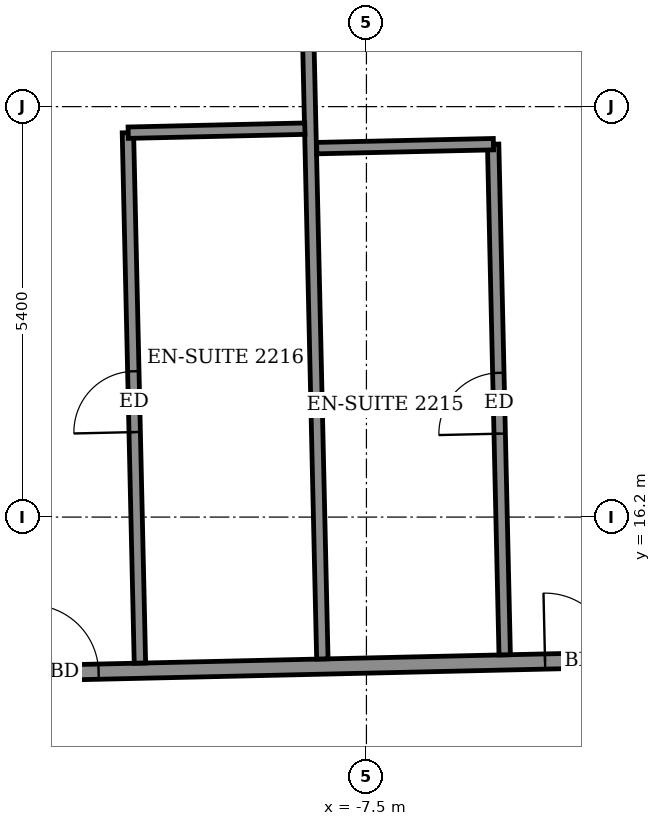
"""IFC4 building model, lengths in metres.
Left out: names, types, materials, properties, quantities, classifications, styles, units other than length and angle.
Written with IfcOpenShell. Run it as: python <this file> out.ifc"""

import sys

from ifc_helpers import new_model, si_unit, direction, frame, frame_2d, origin, place, context, subcontext, project, spatial, rectangle, extrude, element, fill, save


model = new_model("IFC4")
c1 = context("Model", 3, precision=1e-05, world=origin(), true_north=direction((0.0, 1.0)))
c2 = subcontext(c1, "Body", "Model", "MODEL_VIEW")
j1 = project(units=[si_unit("LENGTHUNIT", "METRE"), si_unit("PLANEANGLEUNIT", "RADIAN")], contexts=[c1])
p1 = place(None, origin())
s1 = spatial("IfcSite", under=j1, at=p1, CompositionType="ELEMENT")
p2 = place(p1, origin())
s2 = spatial("IfcBuilding", under=s1, at=p2, CompositionType="ELEMENT")
p3 = place(p2, frame((0.0, 0.0, 90.1)))
s3 = spatial("IfcBuildingStorey", under=s2, at=p3, CompositionType="ELEMENT", Elevation=90.1)
p4 = place(p3, frame((-24.92, 13.851, 0.0), z_axis=(0.0, 0.0, 1.0), x_axis=(0.999742411711, 0.022696039895, 0.0)))
e1 = element("IfcWall", 1, at=p4, inside=s3, PredefinedType="PARTITIONING", context=c2, shape_type="SweptSolid", body=[
    extrude(rectangle(XDim=52.472, YDim=0.2, at=frame_2d((26.236, 0.0))), origin(), (0.0, 0.0, 1.0), 3.05),
])
p5 = place(p4, frame((50.088, 0.0, 0.0)))
e2 = element("IfcOpeningElement", 2, at=p5, cuts=e1, PredefinedType="OPENING", context=c2, shape_type="SweptSolid", body=[
    extrude(rectangle(XDim=1.0, YDim=2.1, at=frame_2d((0.5, 1.05))), frame((0.0, 0.11, 0.0), z_axis=(0.0, -1.0, 0.0), x_axis=(1.0, 0.0, 0.0)), (0.0, 0.0, 1.0), 0.22),
])
p6 = place(p4, frame((45.725, 0.0, 0.0)))
e3 = element("IfcOpeningElement", 3, at=p6, cuts=e1, PredefinedType="OPENING", context=c2, shape_type="SweptSolid", body=[
    extrude(rectangle(XDim=0.9, YDim=2.1, at=frame_2d((0.45, 1.05))), frame((0.0, 0.11, 0.0), z_axis=(0.0, -1.0, 0.0), x_axis=(1.0, 0.0, 0.0)), (0.0, 0.0, 1.0), 0.22),
])
p7 = place(p4, frame((38.975, 0.0, 0.0)))
e4 = element("IfcOpeningElement", 4, at=p7, cuts=e1, PredefinedType="OPENING", context=c2, shape_type="SweptSolid", body=[
    extrude(rectangle(XDim=0.9, YDim=2.1, at=frame_2d((0.45, 1.05))), frame((0.0, 0.11, 0.0), z_axis=(0.0, -1.0, 0.0), x_axis=(1.0, 0.0, 0.0)), (0.0, 0.0, 1.0), 0.22),
])
p8 = place(p4, frame((37.05, 0.0, 0.0)))
e5 = element("IfcOpeningElement", 5, at=p8, cuts=e1, PredefinedType="OPENING", context=c2, shape_type="SweptSolid", body=[
    extrude(rectangle(XDim=0.9, YDim=2.1, at=frame_2d((0.45, 1.05))), frame((0.0, 0.11, 0.0), z_axis=(0.0, -1.0, 0.0), x_axis=(1.0, 0.0, 0.0)), (0.0, 0.0, 1.0), 0.22),
])
p9 = place(p4, frame((30.35, 0.0, 0.0)))
e6 = element("IfcOpeningElement", 6, at=p9, cuts=e1, PredefinedType="OPENING", context=c2, shape_type="SweptSolid", body=[
    extrude(rectangle(XDim=0.9, YDim=2.1, at=frame_2d((0.45, 1.05))), frame((0.0, 0.11, 0.0), z_axis=(0.0, -1.0, 0.0), x_axis=(1.0, 0.0, 0.0)), (0.0, 0.0, 1.0), 0.22),
])
p10 = place(p4, frame((28.4, 0.0, 0.0)))
e7 = element("IfcOpeningElement", 7, at=p10, cuts=e1, PredefinedType="OPENING", context=c2, shape_type="SweptSolid", body=[
    extrude(rectangle(XDim=0.9, YDim=2.1, at=frame_2d((0.45, 1.05))), frame((0.0, 0.11, 0.0), z_axis=(0.0, -1.0, 0.0), x_axis=(1.0, 0.0, 0.0)), (0.0, 0.0, 1.0), 0.22),
])
p11 = place(p4, frame((21.675, 0.0, 0.0)))
e8 = element("IfcOpeningElement", 8, at=p11, cuts=e1, PredefinedType="OPENING", context=c2, shape_type="SweptSolid", body=[
    extrude(rectangle(XDim=0.9, YDim=2.1, at=frame_2d((0.45, 1.05))), frame((0.0, 0.11, 0.0), z_axis=(0.0, -1.0, 0.0), x_axis=(1.0, 0.0, 0.0)), (0.0, 0.0, 1.0), 0.22),
])
p12 = place(p4, frame((19.775, 0.0, 0.0)))
e9 = element("IfcOpeningElement", 9, at=p12, cuts=e1, PredefinedType="OPENING", context=c2, shape_type="SweptSolid", body=[
    extrude(rectangle(XDim=0.9, YDim=2.1, at=frame_2d((0.45, 1.05))), frame((0.0, 0.11, 0.0), z_axis=(0.0, -1.0, 0.0), x_axis=(1.0, 0.0, 0.0)), (0.0, 0.0, 1.0), 0.22),
])
p13 = place(p4, frame((13.0, 0.0, 0.0)))
e10 = element("IfcOpeningElement", 10, at=p13, cuts=e1, PredefinedType="OPENING", context=c2, shape_type="SweptSolid", body=[
    extrude(rectangle(XDim=0.9, YDim=2.1, at=frame_2d((0.45, 1.05))), frame((0.0, 0.11, 0.0), z_axis=(0.0, -1.0, 0.0), x_axis=(1.0, 0.0, 0.0)), (0.0, 0.0, 1.0), 0.22),
])
p14 = place(p4, frame((11.075, 0.0, 0.0)))
e11 = element("IfcOpeningElement", 11, at=p14, cuts=e1, PredefinedType="OPENING", context=c2, shape_type="SweptSolid", body=[
    extrude(rectangle(XDim=0.9, YDim=2.1, at=frame_2d((0.45, 1.05))), frame((0.0, 0.11, 0.0), z_axis=(0.0, -1.0, 0.0), x_axis=(1.0, 0.0, 0.0)), (0.0, 0.0, 1.0), 0.22),
])
p15 = place(p4, frame((3.049, 0.0, 0.0)))
e12 = element("IfcOpeningElement", 12, at=p15, cuts=e1, PredefinedType="OPENING", context=c2, shape_type="SweptSolid", body=[
    extrude(rectangle(XDim=1.0, YDim=2.1, at=frame_2d((0.5, 1.05))), frame((0.0, 0.11, 0.0), z_axis=(0.0, -1.0, 0.0), x_axis=(1.0, 0.0, 0.0)), (0.0, 0.0, 1.0), 0.22),
])
p16 = place(p3, frame((-10.48, 14.279, 0.0), z_axis=(0.0, 0.0, 1.0), x_axis=(-0.022630826984, 0.999743890039, 0.0)))
e13 = element("IfcWall", 13, at=p16, inside=s3, PredefinedType="PARTITIONING", context=c2, shape_type="SweptSolid", body=[
    extrude(rectangle(XDim=6.98, YDim=0.15, at=frame_2d((3.49, 0.0))), origin(), (0.0, 0.0, 1.0), 3.05),
])
p17 = place(p16, frame((3.04, 0.0, 0.0)))
e14 = element("IfcOpeningElement", 14, at=p17, cuts=e13, PredefinedType="OPENING", context=c2, shape_type="SweptSolid", body=[
    extrude(rectangle(XDim=0.8, YDim=2.1, at=frame_2d((0.4, 1.05))), frame((0.0, 0.085, 0.0), z_axis=(0.0, -1.0, 0.0), x_axis=(1.0, 0.0, 0.0)), (0.0, 0.0, 1.0), 0.17),
])
p18 = place(p3, frame((-8.08, 14.334, 0.0), z_axis=(0.0, 0.0, 1.0), x_axis=(-0.022741979748, 0.999741367733, 0.0)))
e15 = element("IfcWall", 15, at=p18, inside=s3, PredefinedType="PARTITIONING", context=c2, shape_type="SweptSolid", body=[
    extrude(rectangle(XDim=12.399, YDim=0.15, at=frame_2d((6.2, 0.0))), origin(), (0.0, 0.0, 1.0), 3.05),
])
p19 = place(p3, frame((-5.681, 14.388, 0.0), z_axis=(0.0, 0.0, 1.0), x_axis=(-0.022634748998, 0.99974380125, 0.0)))
e16 = element("IfcWall", 16, at=p19, inside=s3, PredefinedType="PARTITIONING", context=c2, shape_type="SweptSolid", body=[
    extrude(rectangle(XDim=6.72, YDim=0.15, at=frame_2d((3.36, 0.0))), origin(), (0.0, 0.0, 1.0), 3.05),
])
p20 = place(p19, frame((2.91, 0.0, 0.0)))
e17 = element("IfcOpeningElement", 17, at=p20, cuts=e16, PredefinedType="OPENING", context=c2, shape_type="SweptSolid", body=[
    extrude(rectangle(XDim=0.8, YDim=2.1, at=frame_2d((0.4, 1.05))), frame((0.0, 0.085, 0.0), z_axis=(0.0, -1.0, 0.0), x_axis=(1.0, 0.0, 0.0)), (0.0, 0.0, 1.0), 0.17),
])
p21 = place(p3, frame((-8.154, 21.054, 0.0), z_axis=(0.0, 0.0, 1.0), x_axis=(0.999749954681, 0.022361308448, 0.0)))
e18 = element("IfcWall", 18, at=p21, inside=s3, PredefinedType="PARTITIONING", context=c2, shape_type="SweptSolid", body=[
    extrude(rectangle(XDim=2.325, YDim=0.15, at=frame_2d((1.163, 0.0))), origin(), (0.0, 0.0, 1.0), 3.05),
])
p22 = place(p3, frame((-10.634, 21.257, 0.0), z_axis=(0.0, 0.0, 1.0), x_axis=(0.999740260747, 0.02279059109, 0.0)))
e19 = element("IfcWall", 19, at=p22, inside=s3, PredefinedType="PARTITIONING", context=c2, shape_type="SweptSolid", body=[
    extrude(rectangle(XDim=2.324, YDim=0.15, at=frame_2d((1.162, 0.0))), origin(), (0.0, 0.0, 1.0), 3.05),
])
p23 = place(p12, origin())
e20 = element("IfcDoor", 20, at=p23, inside=s3, OperationType="SINGLE_SWING_LEFT", PredefinedType="DOOR", context=c2, shape_type="SweptSolid", body=[
    extrude(rectangle(XDim=0.9, YDim=2.1, at=frame_2d((0.45, 1.05))), frame((0.0, 0.025, 0.0), z_axis=(0.0, -1.0, 0.0), x_axis=(1.0, 0.0, 0.0)), (0.0, 0.0, 1.0), 0.05),
])
fill(e9, e20)
p24 = place(p20, origin())
e21 = element("IfcDoor", 21, at=p24, inside=s3, OperationType="SINGLE_SWING_LEFT", PredefinedType="DOOR", context=c2, shape_type="SweptSolid", body=[
    extrude(rectangle(XDim=0.8, YDim=2.1, at=frame_2d((0.4, 1.05))), frame((0.0, 0.025, 0.0), z_axis=(0.0, -1.0, 0.0), x_axis=(1.0, 0.0, 0.0)), (0.0, 0.0, 1.0), 0.05),
])
fill(e17, e21)
p25 = place(p13, origin())
e22 = element("IfcDoor", 22, at=p25, inside=s3, OperationType="SINGLE_SWING_RIGHT", PredefinedType="DOOR", context=c2, shape_type="SweptSolid", body=[
    extrude(rectangle(XDim=0.9, YDim=2.1, at=frame_2d((0.45, 1.05))), frame((0.0, 0.025, 0.0), z_axis=(0.0, -1.0, 0.0), x_axis=(1.0, 0.0, 0.0)), (0.0, 0.0, 1.0), 0.05),
])
fill(e10, e22)
p26 = place(p17, origin())
e23 = element("IfcDoor", 23, at=p26, inside=s3, OperationType="SINGLE_SWING_RIGHT", PredefinedType="DOOR", context=c2, shape_type="SweptSolid", body=[
    extrude(rectangle(XDim=0.8, YDim=2.1, at=frame_2d((0.4, 1.05))), frame((0.0, 0.025, 0.0), z_axis=(0.0, -1.0, 0.0), x_axis=(1.0, 0.0, 0.0)), (0.0, 0.0, 1.0), 0.05),
])
fill(e14, e23)
save(model, sys.argv[1])
